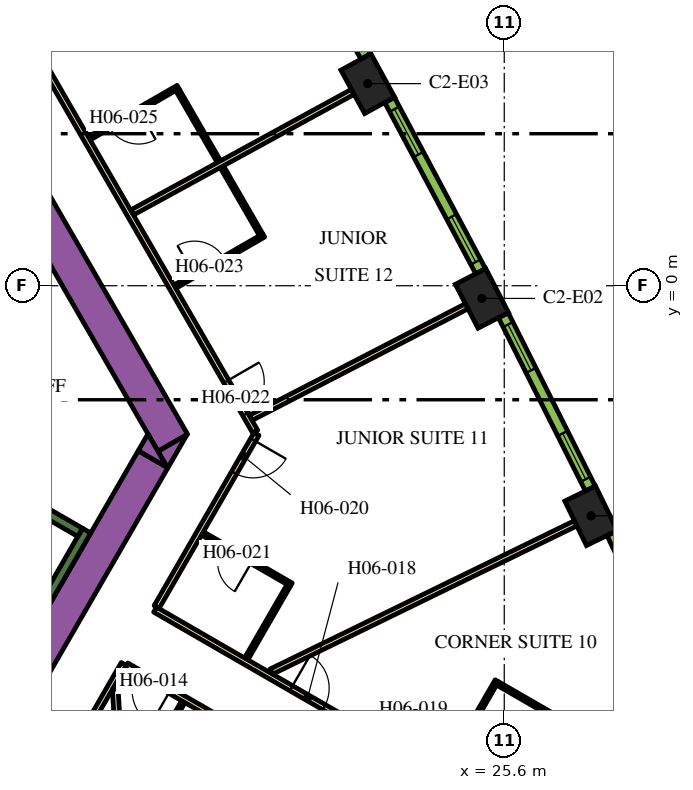
"""IFC4 building model, lengths in metres.
Left out: names, types, materials, properties, quantities, classifications, styles, units other than length and angle.
Written with IfcOpenShell. Run it as: python <this file> out.ifc"""

import sys

from ifc_helpers import new_model, si_unit, direction, frame, frame_2d, origin, origin_2d, place, context, subcontext, project, spatial, polyline, rectangle, outline, extrude, element, fill, save


model = new_model("IFC4")
c1 = context("Model", 3, precision=1e-05, world=origin(), true_north=direction((0.0, 1.0)))
c2 = subcontext(c1, "Body", "Model", "MODEL_VIEW")
j1 = project(units=[si_unit("LENGTHUNIT", "METRE"), si_unit("PLANEANGLEUNIT", "RADIAN")], contexts=[c1])
p1 = place(None, origin())
s1 = spatial("IfcSite", under=j1, at=p1, CompositionType="ELEMENT")
p2 = place(p1, origin())
s2 = spatial("IfcBuilding", under=s1, at=p2, CompositionType="ELEMENT")
p3 = place(p2, frame((0.0, 0.0, 87.6)))
s3 = spatial("IfcBuildingStorey", under=s2, at=p3, CompositionType="ELEMENT", Elevation=87.6)
for number, where, z_axis, x_axis in (
    (1, (27.883, -6.054, 0.0), (0.0, 0.0, 1.0), (-0.438, 0.899, 0.0)),
    (2, (25.012, -0.334, 0.0), (0.0, 0.0, 1.0), (-0.459, 0.888, 0.0)),
    (3, (22.009, 5.317, 0.0), (0.0, 0.0, 1.0), (-0.48, 0.877, 0.0)),
):
    element("IfcColumn", number, at=place(p3, frame(where, z_axis=z_axis, x_axis=x_axis)), inside=s3, PredefinedType="COLUMN", context=c2, shape_type="SweptSolid", body=[
        extrude(rectangle(XDim=1.3, YDim=0.9, at=origin_2d()), origin(), (0.0, 0.0, 1.0), 3.9),
    ])
p4 = place(p3, frame((6.776, 13.364, 0.0), z_axis=(0.0, 0.0, 1.0), x_axis=(0.500004177138, -0.8660229921, 0.0)))
e4 = element("IfcWall", 4, at=p4, inside=s3, PredefinedType="SOLIDWALL", context=c2, shape_type="SweptSolid", body=[
    extrude(rectangle(XDim=20.204, YDim=0.9, at=frame_2d((10.102, 0.0))), origin(), (0.0, 0.0, 1.0), 3.9),
])
p5 = place(p3, origin())
e5 = element("IfcWall", 5, at=p5, inside=s3, PredefinedType="SOLIDWALL", context=c2, shape_type="SweptSolid", body=[
    extrude(outline(polyline([(16.743, -4.8), (16.489, -4.36), (17.251, -3.92), (16.743, -4.8)])), origin(), (0.0, 0.0, 1.0), 3.9),
])
p6 = place(p3, frame((11.695, -12.644, 0.0), z_axis=(0.0, 0.0, 1.0), x_axis=(0.500010229568, 0.86601949766, 0.0)))
e6 = element("IfcWall", 6, at=p6, inside=s3, PredefinedType="SOLIDWALL", context=c2, shape_type="SweptSolid", body=[
    extrude(rectangle(XDim=9.326, YDim=0.9, at=frame_2d((4.663, 0.0))), origin(), (0.0, 0.0, 1.0), 3.9),
])
e7 = element("IfcWall", 7, at=p5, inside=s3, PredefinedType="SOLIDWALL", context=c2, shape_type="SweptSolid", body=[
    extrude(outline(polyline([(16.223, -3.9), (16.732, -4.78), (15.969, -4.34), (16.223, -3.9)])), origin(), (0.0, 0.0, 1.0), 3.9),
])
p7 = place(p3, frame((12.885, -9.431, 0.0), z_axis=(0.0, 0.0, 1.0), x_axis=(0.500020560727, 0.866013532718, 0.0)))
e8 = element("IfcWall", 8, at=p7, inside=s3, PredefinedType="SOLIDWALL", context=c2, shape_type="SweptSolid", body=[
    extrude(rectangle(XDim=3.45, YDim=0.25, at=frame_2d((1.725, 0.0))), origin(), (0.0, 0.0, 1.0), 3.9),
])
p8 = place(p3, frame((8.334, -2.964, 0.0), z_axis=(0.0, 0.0, 1.0), x_axis=(0.866016039709, -0.500016218704, 0.0)))
e9 = element("IfcWall", 9, at=p8, inside=s3, PredefinedType="SOLIDWALL", context=c2, shape_type="SweptSolid", body=[
    extrude(rectangle(XDim=7.05, YDim=0.25, at=frame_2d((3.525, 0.0))), origin(), (0.0, 0.0, 1.0), 3.9),
])
p9 = place(p3, frame((16.412, -8.523, 0.0), z_axis=(0.0, 0.0, 1.0), x_axis=(0.866025629663, -0.499999608766, 0.0)))
e10 = element("IfcWall", 10, at=p9, inside=s3, PredefinedType="PARTITIONING", context=c2, shape_type="SweptSolid", body=[
    extrude(rectangle(XDim=13.624, YDim=0.15, at=frame_2d((6.812, 0.0))), origin(), (0.0, 0.0, 1.0), 2.75),
])
p10 = place(p9, frame((4.134, 0.0, 0.0)))
e11 = element("IfcOpeningElement", 11, at=p10, cuts=e10, PredefinedType="OPENING", context=c2, shape_type="SweptSolid", body=[
    extrude(rectangle(XDim=1.0, YDim=2.1, at=frame_2d((0.5, 1.05))), frame((0.0, 0.085, 0.0), z_axis=(0.0, -1.0, 0.0), x_axis=(1.0, 0.0, 0.0)), (0.0, 0.0, 1.0), 0.17),
])
p11 = place(p3, frame((19.081, -3.9, 0.0), z_axis=(0.0, 0.0, 1.0), x_axis=(-0.499974327079, -0.866040225545, 0.0)))
e12 = element("IfcWall", 12, at=p11, inside=s3, PredefinedType="PARTITIONING", context=c2, shape_type="SweptSolid", body=[
    extrude(rectangle(XDim=5.258, YDim=0.15, at=frame_2d((2.629, 0.0))), origin(), (0.0, 0.0, 1.0), 2.75),
])
p12 = place(p11, frame((0.18, 0.0, 0.0)))
e13 = element("IfcOpeningElement", 13, at=p12, cuts=e12, PredefinedType="OPENING", context=c2, shape_type="SweptSolid", body=[
    extrude(rectangle(XDim=1.0, YDim=2.1, at=frame_2d((0.5, 1.05))), frame((0.0, 0.085, 0.0), z_axis=(0.0, -1.0, 0.0), x_axis=(1.0, 0.0, 0.0)), (0.0, 0.0, 1.0), 0.17),
])
p13 = place(p3, frame((6.163, 18.475, 0.0), z_axis=(0.0, 0.0, 1.0), x_axis=(0.500001317485, -0.866024643133, 0.0)))
e14 = element("IfcWall", 14, at=p13, inside=s3, PredefinedType="PARTITIONING", context=c2, shape_type="SweptSolid", body=[
    extrude(rectangle(XDim=25.767, YDim=0.15, at=frame_2d((12.883, 0.0))), origin(), (0.0, 0.0, 1.0), 2.75),
])
p14 = place(p13, frame((24.241, 0.0, 0.0)))
e15 = element("IfcOpeningElement", 15, at=p14, cuts=e14, PredefinedType="OPENING", context=c2, shape_type="SweptSolid", body=[
    extrude(rectangle(XDim=1.0, YDim=2.1, at=frame_2d((0.5, 1.05))), frame((0.0, 0.085, 0.0), z_axis=(0.0, -1.0, 0.0), x_axis=(1.0, 0.0, 0.0)), (0.0, 0.0, 1.0), 0.17),
])
p15 = place(p13, frame((13.144, 0.0, 0.0)))
e16 = element("IfcOpeningElement", 16, at=p15, cuts=e14, PredefinedType="OPENING", context=c2, shape_type="SweptSolid", body=[
    extrude(rectangle(XDim=1.0, YDim=2.1, at=frame_2d((0.5, 1.05))), frame((0.0, 0.085, 0.0), z_axis=(0.0, -1.0, 0.0), x_axis=(1.0, 0.0, 0.0)), (0.0, 0.0, 1.0), 0.17),
])
p16 = place(p13, frame((10.874, 0.0, 0.0)))
e17 = element("IfcOpeningElement", 17, at=p16, cuts=e14, PredefinedType="OPENING", context=c2, shape_type="SweptSolid", body=[
    extrude(rectangle(XDim=0.9, YDim=2.1, at=frame_2d((0.45, 1.05))), frame((0.0, 0.085, 0.0), z_axis=(0.0, -1.0, 0.0), x_axis=(1.0, 0.0, 0.0)), (0.0, 0.0, 1.0), 0.17),
])
p17 = place(p13, frame((3.718, 0.0, 0.0)))
e18 = element("IfcOpeningElement", 18, at=p17, cuts=e14, PredefinedType="OPENING", context=c2, shape_type="SweptSolid", body=[
    extrude(rectangle(XDim=1.1, YDim=2.1, at=frame_2d((0.55, 1.05))), frame((0.0, 0.085, 0.0), z_axis=(0.0, -1.0, 0.0), x_axis=(1.0, 0.0, 0.0)), (0.0, 0.0, 1.0), 0.17),
])
p18 = place(p13, frame((2.411, 0.0, 0.0)))
e19 = element("IfcOpeningElement", 19, at=p18, cuts=e14, PredefinedType="OPENING", context=c2, shape_type="SweptSolid", body=[
    extrude(rectangle(XDim=1.0, YDim=2.1, at=frame_2d((0.5, 1.05))), frame((0.0, 0.085, 0.0), z_axis=(0.0, -1.0, 0.0), x_axis=(1.0, 0.0, 0.0)), (0.0, 0.0, 1.0), 0.17),
])
p19 = place(p3, frame((15.587, -9.952, 0.0), z_axis=(0.0, 0.0, 1.0), x_axis=(-0.500016618951, -0.866015808616, 0.0)))
e20 = element("IfcWall", 20, at=p19, inside=s3, PredefinedType="PARTITIONING", context=c2, shape_type="SweptSolid", body=[
    extrude(rectangle(XDim=5.268, YDim=0.15, at=frame_2d((2.634, 0.0))), origin(), (0.0, 0.0, 1.0), 2.75),
])
p20 = place(p3, frame((27.386, -16.764, 0.0), z_axis=(0.0, 0.0, 1.0), x_axis=(-0.866022585856, 0.500004880763, 0.0)))
e21 = element("IfcWall", 21, at=p20, inside=s3, PredefinedType="PARTITIONING", context=c2, shape_type="SweptSolid", body=[
    extrude(rectangle(XDim=13.544, YDim=0.15, at=frame_2d((6.772, 0.0))), origin(), (0.0, 0.0, 1.0), 2.75),
])
p21 = place(p20, frame((12.214, 0.0, 0.0)))
e22 = element("IfcOpeningElement", 22, at=p21, cuts=e21, PredefinedType="OPENING", context=c2, shape_type="SweptSolid", body=[
    extrude(rectangle(XDim=1.0, YDim=2.1, at=frame_2d((0.5, 1.05))), frame((0.0, 0.085, 0.0), z_axis=(0.0, -1.0, 0.0), x_axis=(1.0, 0.0, 0.0)), (0.0, 0.0, 1.0), 0.17),
])
p22 = place(p20, frame((8.49, 0.0, 0.0)))
e23 = element("IfcOpeningElement", 23, at=p22, cuts=e21, PredefinedType="OPENING", context=c2, shape_type="SweptSolid", body=[
    extrude(rectangle(XDim=1.0, YDim=2.1, at=frame_2d((0.5, 1.05))), frame((0.0, 0.085, 0.0), z_axis=(0.0, -1.0, 0.0), x_axis=(1.0, 0.0, 0.0)), (0.0, 0.0, 1.0), 0.17),
])
p23 = place(p3, frame((15.999, -21.467, 0.0), z_axis=(0.0, 0.0, 1.0), x_axis=(-0.058433825336, 0.998291284173, 0.0)))
e24 = element("IfcWall", 24, at=p23, inside=s3, PredefinedType="PARTITIONING", context=c2, shape_type="SweptSolid", body=[
    extrude(rectangle(XDim=10.875, YDim=0.15, at=frame_2d((5.438, 0.0))), origin(), (0.0, 0.0, 1.0), 2.75),
])
p24 = place(p3, frame((21.614, 5.102, 0.0), z_axis=(0.0, 0.0, 1.0), x_axis=(-0.877484555087, -0.479604895287, 0.0)))
e25 = element("IfcWall", 25, at=p24, inside=s3, PredefinedType="PARTITIONING", context=c2, shape_type="SweptSolid", body=[
    extrude(rectangle(XDim=6.611, YDim=0.15, at=frame_2d((3.306, 0.0))), origin(), (0.0, 0.0, 1.0), 2.75),
])
p25 = place(p3, frame((24.613, -0.541, 0.0), z_axis=(0.0, 0.0, 1.0), x_axis=(-0.888459912519, -0.458954228487, 0.0)))
e26 = element("IfcWall", 26, at=p25, inside=s3, PredefinedType="PARTITIONING", context=c2, shape_type="SweptSolid", body=[
    extrude(rectangle(XDim=6.392, YDim=0.15, at=frame_2d((3.196, 0.0))), origin(), (0.0, 0.0, 1.0), 2.75),
])
p26 = place(p3, frame((27.479, -6.251, 0.0), z_axis=(0.0, 0.0, 1.0), x_axis=(-0.898945877276, -0.438059710231, 0.0)))
e27 = element("IfcWall", 27, at=p26, inside=s3, PredefinedType="PARTITIONING", context=c2, shape_type="SweptSolid", body=[
    extrude(rectangle(XDim=8.909, YDim=0.15, at=frame_2d((4.455, 0.0))), origin(), (0.0, 0.0, 1.0), 2.75),
])
p27 = place(p3, frame((17.155, -10.944, 0.0), z_axis=(0.0, 0.0, 1.0), x_axis=(-0.499939757307, -0.866060182126, 0.0)))
e28 = element("IfcWall", 28, at=p27, inside=s3, PredefinedType="PARTITIONING", context=c2, shape_type="SweptSolid", body=[
    extrude(rectangle(XDim=2.95, YDim=0.1, at=frame_2d((1.475, 0.0))), origin(), (0.0, 0.0, 1.0), 2.75),
])
p28 = place(p27, frame((0.6, 0.0, 0.0)))
e29 = element("IfcOpeningElement", 29, at=p28, cuts=e28, PredefinedType="OPENING", context=c2, shape_type="SweptSolid", body=[
    extrude(rectangle(XDim=0.9, YDim=2.1, at=frame_2d((0.45, 1.05))), frame((0.0, 0.06, 0.0), z_axis=(0.0, -1.0, 0.0), x_axis=(1.0, 0.0, 0.0)), (0.0, 0.0, 1.0), 0.12),
])
p29 = place(p3, frame((25.404, -10.395, 0.0), z_axis=(0.0, 0.0, 1.0), x_axis=(-0.500011755427, -0.866018616679, 0.0)))
e30 = element("IfcWall", 30, at=p29, inside=s3, PredefinedType="PARTITIONING", context=c2, shape_type="SweptSolid", body=[
    extrude(rectangle(XDim=2.8, YDim=0.1, at=frame_2d((1.4, 0.0))), origin(), (0.0, 0.0, 1.0), 2.75),
])
p30 = place(p29, frame((1.3, 0.0, 0.0)))
e31 = element("IfcOpeningElement", 31, at=p30, cuts=e30, PredefinedType="OPENING", context=c2, shape_type="SweptSolid", body=[
    extrude(rectangle(XDim=0.9, YDim=2.1, at=frame_2d((0.45, 1.05))), frame((0.0, 0.06, 0.0), z_axis=(0.0, -1.0, 0.0), x_axis=(1.0, 0.0, 0.0)), (0.0, 0.0, 1.0), 0.12),
])
p31 = place(p3, frame((25.422, -10.463, 0.0), z_axis=(0.0, 0.0, 1.0), x_axis=(0.866024647952, -0.500001309137, 0.0)))
e32 = element("IfcWall", 32, at=p31, inside=s3, PredefinedType="PARTITIONING", context=c2, shape_type="SweptSolid", body=[
    extrude(rectangle(XDim=2.4, YDim=0.1, at=frame_2d((1.2, 0.0))), origin(), (0.0, 0.0, 1.0), 2.75),
])
p32 = place(p3, frame((19.996, -7.867, 0.0), z_axis=(0.0, 0.0, 1.0), x_axis=(-0.866019956843, 0.50000943426, 0.0)))
e33 = element("IfcWall", 33, at=p32, inside=s3, PredefinedType="PARTITIONING", context=c2, shape_type="SweptSolid", body=[
    extrude(rectangle(XDim=2.7, YDim=0.1, at=frame_2d((1.35, 0.0))), origin(), (0.0, 0.0, 1.0), 2.75),
])
p33 = place(p32, frame((1.2, 0.0, 0.0)))
e34 = element("IfcOpeningElement", 34, at=p33, cuts=e33, PredefinedType="OPENING", context=c2, shape_type="SweptSolid", body=[
    extrude(rectangle(XDim=0.9, YDim=2.1, at=frame_2d((0.45, 1.05))), frame((0.0, 0.06, 0.0), z_axis=(0.0, -1.0, 0.0), x_axis=(1.0, 0.0, 0.0)), (0.0, 0.0, 1.0), 0.12),
])
p34 = place(p3, frame((19.922, -7.894, 0.0), z_axis=(0.0, 0.0, 1.0), x_axis=(-0.499995378973, -0.866028071719, 0.0)))
e35 = element("IfcWall", 35, at=p34, inside=s3, PredefinedType="PARTITIONING", context=c2, shape_type="SweptSolid", body=[
    extrude(rectangle(XDim=2.22, YDim=0.1, at=frame_2d((1.11, 0.0))), origin(), (0.0, 0.0, 1.0), 2.75),
])
p35 = place(p3, frame((16.931, -0.026, 0.0), z_axis=(0.0, 0.0, 1.0), x_axis=(0.866059108428, 0.4999416173, 0.0)))
e36 = element("IfcWall", 36, at=p35, inside=s3, PredefinedType="PARTITIONING", context=c2, shape_type="SweptSolid", body=[
    extrude(rectangle(XDim=2.7, YDim=0.1, at=frame_2d((1.35, 0.0))), origin(), (0.0, 0.0, 1.0), 2.75),
])
p36 = place(p35, frame((0.6, 0.0, 0.0)))
e37 = element("IfcOpeningElement", 37, at=p36, cuts=e36, PredefinedType="OPENING", context=c2, shape_type="SweptSolid", body=[
    extrude(rectangle(XDim=0.9, YDim=2.1, at=frame_2d((0.45, 1.05))), frame((0.0, 0.06, 0.0), z_axis=(0.0, -1.0, 0.0), x_axis=(1.0, 0.0, 0.0)), (0.0, 0.0, 1.0), 0.12),
])
p37 = place(p3, frame((19.196, 1.351, 0.0), z_axis=(0.0, 0.0, 1.0), x_axis=(-0.499956128963, 0.866050731258, 0.0)))
e38 = element("IfcWall", 38, at=p37, inside=s3, PredefinedType="PARTITIONING", context=c2, shape_type="SweptSolid", body=[
    extrude(rectangle(XDim=2.05, YDim=0.1, at=frame_2d((1.025, 0.0))), origin(), (0.0, 0.0, 1.0), 2.75),
])
p38 = place(p3, frame((17.016, 5.228, 0.0), z_axis=(0.0, 0.0, 1.0), x_axis=(-0.86599734893, -0.500048589285, 0.0)))
e39 = element("IfcWall", 39, at=p38, inside=s3, PredefinedType="PARTITIONING", context=c2, shape_type="SweptSolid", body=[
    extrude(rectangle(XDim=2.7, YDim=0.1, at=frame_2d((1.35, 0.0))), origin(), (0.0, 0.0, 1.0), 2.75),
])
p39 = place(p38, frame((1.2, 0.0, 0.0)))
e40 = element("IfcOpeningElement", 40, at=p39, cuts=e39, PredefinedType="OPENING", context=c2, shape_type="SweptSolid", body=[
    extrude(rectangle(XDim=0.9, YDim=2.1, at=frame_2d((0.45, 1.05))), frame((0.0, 0.06, 0.0), z_axis=(0.0, -1.0, 0.0), x_axis=(1.0, 0.0, 0.0)), (0.0, 0.0, 1.0), 0.12),
])
p40 = place(p3, frame((16.997, 5.16, 0.0), z_axis=(0.0, 0.0, 1.0), x_axis=(0.500011965869, -0.866018495177, 0.0)))
e41 = element("IfcWall", 41, at=p40, inside=s3, PredefinedType="PARTITIONING", context=c2, shape_type="SweptSolid", body=[
    extrude(rectangle(XDim=2.19, YDim=0.1, at=frame_2d((1.095, 0.0))), origin(), (0.0, 0.0, 1.0), 2.75),
])
p41 = place(p3, frame((30.62, -11.127, 0.0), z_axis=(0.0, 0.0, 1.0), x_axis=(-0.427543726596, 0.903994669148, 0.0)))
e42 = element("IfcWall", 42, at=p41, inside=s3, PredefinedType="SOLIDWALL", context=c2, shape_type="SweptSolid", body=[
    extrude(rectangle(XDim=5.107, YDim=0.29, at=frame_2d((2.553, 0.0))), origin(), (0.0, 0.0, 1.0), 3.65),
])
p42 = place(p41, frame((0.24, 0.0, 0.9)))
e43 = element("IfcOpeningElement", 43, at=p42, cuts=e42, PredefinedType="OPENING", context=c2, shape_type="SweptSolid", body=[
    extrude(rectangle(XDim=1.35, YDim=2.15, at=frame_2d((0.675, 1.075))), frame((0.0, 0.155, 0.0), z_axis=(0.0, -1.0, 0.0), x_axis=(1.0, 0.0, 0.0)), (0.0, 0.0, 1.0), 0.31),
])
p43 = place(p41, frame((3.471, 0.0, 0.9)))
e44 = element("IfcOpeningElement", 44, at=p43, cuts=e42, PredefinedType="OPENING", context=c2, shape_type="SweptSolid", body=[
    extrude(rectangle(XDim=1.35, YDim=2.15, at=frame_2d((0.675, 1.075))), frame((0.0, 0.155, 0.0), z_axis=(0.0, -1.0, 0.0), x_axis=(1.0, 0.0, 0.0)), (0.0, 0.0, 1.0), 0.31),
])
p44 = place(p3, frame((27.864, -5.336, 0.0), z_axis=(0.0, 0.0, 1.0), x_axis=(-0.448534297211, 0.893765620409, 0.0)))
e45 = element("IfcWall", 45, at=p44, inside=s3, PredefinedType="SOLIDWALL", context=c2, shape_type="SweptSolid", body=[
    extrude(rectangle(XDim=5.1, YDim=0.29, at=frame_2d((2.55, 0.0))), origin(), (0.0, 0.0, 1.0), 3.65),
])
p45 = place(p44, frame((0.272, 0.0, 0.9)))
e46 = element("IfcOpeningElement", 46, at=p45, cuts=e45, PredefinedType="OPENING", context=c2, shape_type="SweptSolid", body=[
    extrude(rectangle(XDim=1.35, YDim=2.15, at=frame_2d((0.675, 1.075))), frame((0.0, 0.155, 0.0), z_axis=(0.0, -1.0, 0.0), x_axis=(1.0, 0.0, 0.0)), (0.0, 0.0, 1.0), 0.31),
])
p46 = place(p44, frame((3.478, 0.0, 0.9)))
e47 = element("IfcOpeningElement", 47, at=p46, cuts=e45, PredefinedType="OPENING", context=c2, shape_type="SweptSolid", body=[
    extrude(rectangle(XDim=1.35, YDim=2.15, at=frame_2d((0.675, 1.075))), frame((0.0, 0.155, 0.0), z_axis=(0.0, -1.0, 0.0), x_axis=(1.0, 0.0, 0.0)), (0.0, 0.0, 1.0), 0.31),
])
p47 = place(p3, frame((24.977, 0.383, 0.0), z_axis=(0.0, 0.0, 1.0), x_axis=(-0.469323203119, 0.883026461106, 0.0)))
e48 = element("IfcWall", 48, at=p47, inside=s3, PredefinedType="SOLIDWALL", context=c2, shape_type="SweptSolid", body=[
    extrude(rectangle(XDim=5.101, YDim=0.29, at=frame_2d((2.55, 0.0))), origin(), (0.0, 0.0, 1.0), 3.65),
])
p48 = place(p47, frame((0.273, 0.0, 0.9)))
e49 = element("IfcOpeningElement", 49, at=p48, cuts=e48, PredefinedType="OPENING", context=c2, shape_type="SweptSolid", body=[
    extrude(rectangle(XDim=1.35, YDim=2.15, at=frame_2d((0.675, 1.075))), frame((0.0, 0.155, 0.0), z_axis=(0.0, -1.0, 0.0), x_axis=(1.0, 0.0, 0.0)), (0.0, 0.0, 1.0), 0.31),
])
p49 = place(p47, frame((3.478, 0.0, 0.9)))
e50 = element("IfcOpeningElement", 50, at=p49, cuts=e48, PredefinedType="OPENING", context=c2, shape_type="SweptSolid", body=[
    extrude(rectangle(XDim=1.35, YDim=2.15, at=frame_2d((0.675, 1.075))), frame((0.0, 0.155, 0.0), z_axis=(0.0, -1.0, 0.0), x_axis=(1.0, 0.0, 0.0)), (0.0, 0.0, 1.0), 0.31),
])
p50 = place(p3, frame((21.956, 6.033, 0.0), z_axis=(0.0, 0.0, 1.0), x_axis=(-0.48983164787, 0.87181704316, 0.0)))
e51 = element("IfcWall", 51, at=p50, inside=s3, PredefinedType="SOLIDWALL", context=c2, shape_type="SweptSolid", body=[
    extrude(rectangle(XDim=5.1, YDim=0.29, at=frame_2d((2.55, 0.0))), origin(), (0.0, 0.0, 1.0), 3.65),
])
p51 = place(p50, frame((0.273, 0.0, 0.9)))
e52 = element("IfcOpeningElement", 52, at=p51, cuts=e51, PredefinedType="OPENING", context=c2, shape_type="SweptSolid", body=[
    extrude(rectangle(XDim=1.35, YDim=2.15, at=frame_2d((0.675, 1.075))), frame((0.0, 0.155, 0.0), z_axis=(0.0, -1.0, 0.0), x_axis=(1.0, 0.0, 0.0)), (0.0, 0.0, 1.0), 0.31),
])
p52 = place(p50, frame((3.478, 0.0, 0.9)))
e53 = element("IfcOpeningElement", 53, at=p52, cuts=e51, PredefinedType="OPENING", context=c2, shape_type="SweptSolid", body=[
    extrude(rectangle(XDim=1.35, YDim=2.15, at=frame_2d((0.675, 1.075))), frame((0.0, 0.155, 0.0), z_axis=(0.0, -1.0, 0.0), x_axis=(1.0, 0.0, 0.0)), (0.0, 0.0, 1.0), 0.31),
])
p53 = place(p21, origin())
e54 = element("IfcDoor", 54, at=p53, inside=s3, OperationType="SINGLE_SWING_RIGHT", PredefinedType="DOOR", context=c2, shape_type="SweptSolid", body=[
    extrude(rectangle(XDim=1.0, YDim=2.1, at=frame_2d((0.5, 1.05))), frame((0.0, 0.025, 0.0), z_axis=(0.0, -1.0, 0.0), x_axis=(1.0, 0.0, 0.0)), (0.0, 0.0, 1.0), 0.05),
])
fill(e22, e54)
p54 = place(p10, origin())
e55 = element("IfcDoor", 55, at=p54, inside=s3, OperationType="SINGLE_SWING_LEFT", PredefinedType="DOOR", context=c2, shape_type="SweptSolid", body=[
    extrude(rectangle(XDim=1.0, YDim=2.1, at=frame_2d((0.5, 1.05))), frame((0.0, 0.025, 0.0), z_axis=(0.0, -1.0, 0.0), x_axis=(1.0, 0.0, 0.0)), (0.0, 0.0, 1.0), 0.05),
])
fill(e11, e55)
p55 = place(p12, origin())
e56 = element("IfcDoor", 56, at=p55, inside=s3, OperationType="SINGLE_SWING_LEFT", PredefinedType="DOOR", context=c2, shape_type="SweptSolid", body=[
    extrude(rectangle(XDim=1.0, YDim=2.1, at=frame_2d((0.5, 1.05))), frame((0.0, 0.025, 0.0), z_axis=(0.0, -1.0, 0.0), x_axis=(1.0, 0.0, 0.0)), (0.0, 0.0, 1.0), 0.05),
])
fill(e13, e56)
p56 = place(p33, origin())
e57 = element("IfcDoor", 57, at=p56, inside=s3, OperationType="SINGLE_SWING_LEFT", PredefinedType="DOOR", context=c2, shape_type="SweptSolid", body=[
    extrude(rectangle(XDim=0.9, YDim=2.1, at=frame_2d((0.45, 1.05))), frame((0.0, 0.025, 0.0), z_axis=(0.0, -1.0, 0.0), x_axis=(1.0, 0.0, 0.0)), (0.0, 0.0, 1.0), 0.05),
])
fill(e34, e57)
p57 = place(p14, origin())
e58 = element("IfcDoor", 58, at=p57, inside=s3, OperationType="SINGLE_SWING_RIGHT", PredefinedType="DOOR", context=c2, shape_type="SweptSolid", body=[
    extrude(rectangle(XDim=1.0, YDim=2.1, at=frame_2d((0.5, 1.05))), frame((0.0, 0.025, 0.0), z_axis=(0.0, -1.0, 0.0), x_axis=(1.0, 0.0, 0.0)), (0.0, 0.0, 1.0), 0.05),
])
fill(e15, e58)
p58 = place(p36, origin())
e59 = element("IfcDoor", 59, at=p58, inside=s3, OperationType="SINGLE_SWING_RIGHT", PredefinedType="DOOR", context=c2, shape_type="SweptSolid", body=[
    extrude(rectangle(XDim=0.9, YDim=2.1, at=frame_2d((0.45, 1.05))), frame((0.0, 0.025, 0.0), z_axis=(0.0, -1.0, 0.0), x_axis=(1.0, 0.0, 0.0)), (0.0, 0.0, 1.0), 0.05),
])
fill(e37, e59)
p59 = place(p39, origin())
e60 = element("IfcDoor", 60, at=p59, inside=s3, OperationType="SINGLE_SWING_LEFT", PredefinedType="DOOR", context=c2, shape_type="SweptSolid", body=[
    extrude(rectangle(XDim=0.9, YDim=2.1, at=frame_2d((0.45, 1.05))), frame((0.0, 0.025, 0.0), z_axis=(0.0, -1.0, 0.0), x_axis=(1.0, 0.0, 0.0)), (0.0, 0.0, 1.0), 0.05),
])
fill(e40, e60)
p60 = place(p45, origin())
e61 = element("IfcWindow", 61, at=p60, inside=s3, PartitioningType="DOUBLE_PANEL_VERTICAL", PredefinedType="WINDOW", context=c2, shape_type="SweptSolid", body=[
    extrude(rectangle(XDim=1.35, YDim=2.15, at=frame_2d((0.675, 1.075))), frame((0.0, 0.015, 0.0), z_axis=(0.0, -1.0, 0.0), x_axis=(1.0, 0.0, 0.0)), (0.0, 0.0, 1.0), 0.06),
])
fill(e46, e61)
p61 = place(p46, origin())
e62 = element("IfcWindow", 62, at=p61, inside=s3, PartitioningType="DOUBLE_PANEL_VERTICAL", PredefinedType="WINDOW", context=c2, shape_type="SweptSolid", body=[
    extrude(rectangle(XDim=1.35, YDim=2.15, at=frame_2d((0.675, 1.075))), frame((0.0, 0.015, 0.0), z_axis=(0.0, -1.0, 0.0), x_axis=(1.0, 0.0, 0.0)), (0.0, 0.0, 1.0), 0.06),
])
fill(e47, e62)
p62 = place(p48, origin())
e63 = element("IfcWindow", 63, at=p62, inside=s3, PartitioningType="DOUBLE_PANEL_VERTICAL", PredefinedType="WINDOW", context=c2, shape_type="SweptSolid", body=[
    extrude(rectangle(XDim=1.35, YDim=2.15, at=frame_2d((0.675, 1.075))), frame((0.0, 0.015, 0.0), z_axis=(0.0, -1.0, 0.0), x_axis=(1.0, 0.0, 0.0)), (0.0, 0.0, 1.0), 0.06),
])
fill(e49, e63)
p63 = place(p49, origin())
e64 = element("IfcWindow", 64, at=p63, inside=s3, PartitioningType="DOUBLE_PANEL_VERTICAL", PredefinedType="WINDOW", context=c2, shape_type="SweptSolid", body=[
    extrude(rectangle(XDim=1.35, YDim=2.15, at=frame_2d((0.675, 1.075))), frame((0.0, 0.015, 0.0), z_axis=(0.0, -1.0, 0.0), x_axis=(1.0, 0.0, 0.0)), (0.0, 0.0, 1.0), 0.06),
])
fill(e50, e64)
save(model, sys.argv[1])
